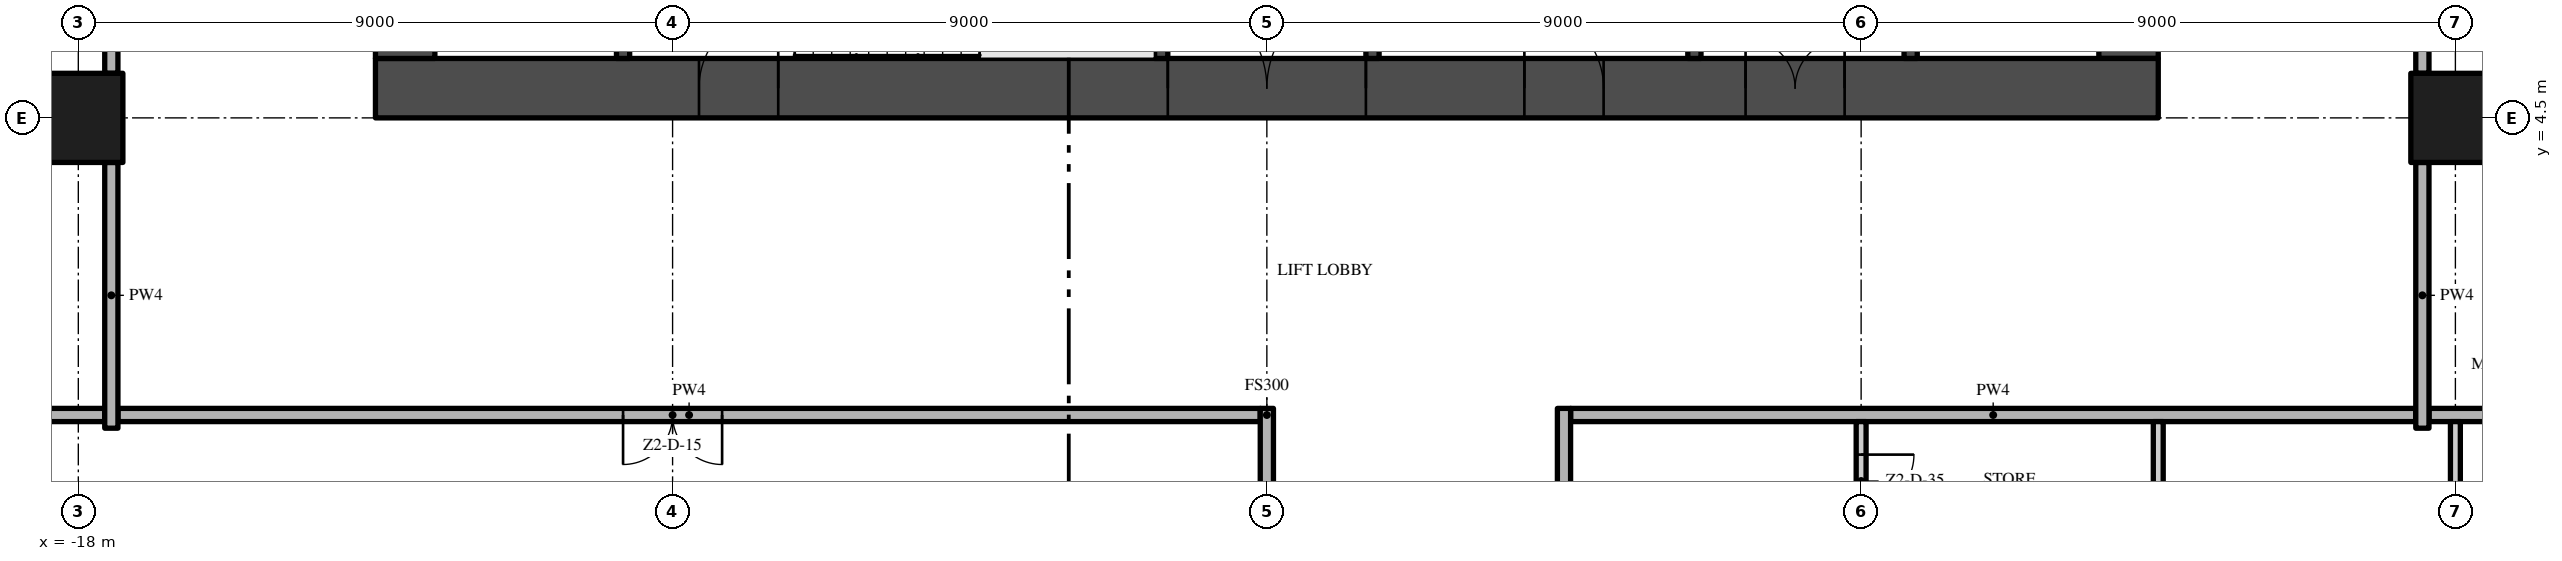
"""IFC4 building model, lengths in metres.
Left out: names, types, materials, properties, quantities, classifications, styles, units other than length and angle.
Written with IfcOpenShell. Run it as: python <this file> out.ifc"""

import sys

from ifc_helpers import new_model, si_unit, direction, frame, frame_2d, origin, origin_2d, place, context, subcontext, project, spatial, rectangle, extrude, element, fill, save


model = new_model("IFC4")
c1 = context("Model", 3, precision=1e-05, world=origin(), true_north=direction((0.0, 1.0)))
c2 = subcontext(c1, "Body", "Model", "MODEL_VIEW")
j1 = project(units=[si_unit("LENGTHUNIT", "METRE"), si_unit("PLANEANGLEUNIT", "RADIAN")], contexts=[c1])
p1 = place(None, origin())
s1 = spatial("IfcSite", under=j1, at=p1, CompositionType="ELEMENT")
p2 = place(p1, origin())
s2 = spatial("IfcBuilding", under=s1, at=p2, CompositionType="ELEMENT")
p3 = place(p2, frame((0.0, 0.0, 103.6)))
s3 = spatial("IfcBuildingStorey", under=s2, at=p3, CompositionType="ELEMENT", Elevation=103.6)
p4 = place(p3, frame((-13.5, 4.95, -0.3), z_axis=(0.0, 0.0, 1.0), x_axis=(1.0, 0.0, 0.0)))
e1 = element("IfcWall", 1, at=p4, inside=s3, PredefinedType="SHEAR", context=c2, shape_type="SweptSolid", body=[
    extrude(rectangle(XDim=27.0, YDim=0.9, at=frame_2d((13.5, 0.0))), origin(), (0.0, 0.0, 1.0), 3.8),
])
p5 = place(p4, frame((12.0, 0.0, 0.3)))
e2 = element("IfcOpeningElement", 2, at=p5, cuts=e1, PredefinedType="OPENING", context=c2, shape_type="SweptSolid", body=[
    extrude(rectangle(XDim=3.0, YDim=2.4, at=frame_2d((1.5, 1.2))), frame((0.0, 0.46, 0.0), z_axis=(0.0, -1.0, 0.0), x_axis=(1.0, 0.0, 0.0)), (0.0, 0.0, 1.0), 0.92),
])
p6 = place(p4, frame((4.9, 0.0, 0.3)))
e3 = element("IfcOpeningElement", 3, at=p6, cuts=e1, PredefinedType="OPENING", context=c2, shape_type="SweptSolid", body=[
    extrude(rectangle(XDim=1.2, YDim=2.2, at=frame_2d((0.6, 1.1))), frame((0.0, 0.46, 0.0), z_axis=(0.0, -1.0, 0.0), x_axis=(1.0, 0.0, 0.0)), (0.0, 0.0, 1.0), 0.92),
])
p7 = place(p4, frame((20.75, 0.0, 0.3)))
e4 = element("IfcOpeningElement", 4, at=p7, cuts=e1, PredefinedType="OPENING", context=c2, shape_type="SweptSolid", body=[
    extrude(rectangle(XDim=1.5, YDim=2.2, at=frame_2d((0.75, 1.1))), frame((0.0, 0.46, 0.0), z_axis=(0.0, -1.0, 0.0), x_axis=(1.0, 0.0, 0.0)), (0.0, 0.0, 1.0), 0.92),
])
p8 = place(p4, frame((17.4, 0.0, 0.3)))
e5 = element("IfcOpeningElement", 5, at=p8, cuts=e1, PredefinedType="OPENING", context=c2, shape_type="SweptSolid", body=[
    extrude(rectangle(XDim=1.2, YDim=2.2, at=frame_2d((0.6, 1.1))), frame((0.0, 0.46, 0.0), z_axis=(0.0, -1.0, 0.0), x_axis=(1.0, 0.0, 0.0)), (0.0, 0.0, 1.0), 0.92),
])
p9 = place(p3, frame((13.05, 5.4, -0.3), z_axis=(0.0, 0.0, 1.0), x_axis=(0.0, 1.0, 0.0)))
e6 = element("IfcWall", 6, at=p9, inside=s3, PredefinedType="SHEAR", context=c2, shape_type="SweptSolid", body=[
    extrude(rectangle(XDim=16.2, YDim=0.9, at=frame_2d((8.1, 0.0))), origin(), (0.0, 0.0, 1.0), 3.8),
])
p10 = place(p9, frame((6.0, 0.0, 0.3)))
e7 = element("IfcOpeningElement", 7, at=p10, cuts=e6, PredefinedType="OPENING", context=c2, shape_type="SweptSolid", body=[
    extrude(rectangle(XDim=1.2, YDim=2.2, at=frame_2d((0.6, 1.1))), frame((0.0, 0.46, 0.0), z_axis=(0.0, -1.0, 0.0), x_axis=(1.0, 0.0, 0.0)), (0.0, 0.0, 1.0), 0.92),
])
p11 = place(p3, frame((-13.05, 21.6, -0.3), z_axis=(0.0, 0.0, 1.0), x_axis=(0.0, -1.0, 0.0)))
e8 = element("IfcWall", 8, at=p11, inside=s3, PredefinedType="SHEAR", context=c2, shape_type="SweptSolid", body=[
    extrude(rectangle(XDim=16.2, YDim=0.9, at=frame_2d((8.1, 0.0))), origin(), (0.0, 0.0, 1.0), 3.8),
])
p12 = place(p11, frame((9.0, 0.0, 0.3)))
e9 = element("IfcOpeningElement", 9, at=p12, cuts=e8, PredefinedType="OPENING", context=c2, shape_type="SweptSolid", body=[
    extrude(rectangle(XDim=1.2, YDim=2.2, at=frame_2d((0.6, 1.1))), frame((0.0, 0.46, 0.0), z_axis=(0.0, -1.0, 0.0), x_axis=(1.0, 0.0, 0.0)), (0.0, 0.0, 1.0), 0.92),
])
for number, where, z_axis, x_axis in (
    (10, (-18.0, 4.5, 0.0), (0.0, 0.0, 1.0), (1.0, 0.0, 0.0)),
    (11, (18.0, 4.5, 0.0), (0.0, 0.0, 1.0), (1.0, 0.0, 0.0)),
):
    element("IfcColumn", number, at=place(p3, frame(where, z_axis=z_axis, x_axis=x_axis)), inside=s3, PredefinedType="COLUMN", context=c2, shape_type="SweptSolid", body=[
        extrude(rectangle(XDim=1.35, YDim=1.35, at=origin_2d()), origin(), (0.0, 0.0, 1.0), 3.5),
    ])
for number, where, z_axis, x_axis in (
    (12, (-9.75, 5.4, 0.0), (0.0, 0.0, 1.0), (0.0, 1.0, 0.0)),
    (13, (-1.6, 5.4, 0.0), (0.0, 0.0, 1.0), (0.0, 1.0, 0.0)),
):
    element("IfcWall", number, at=place(p3, frame(where, z_axis=z_axis, x_axis=x_axis)), inside=s3, PredefinedType="SHEAR", context=c2, shape_type="SweptSolid", body=[
        extrude(rectangle(XDim=2.55, YDim=0.2, at=frame_2d((1.275, 0.0))), origin(), (0.0, 0.0, 1.0), 3.5),
    ])
p13 = place(p3, frame((1.6, 11.5, 0.0), z_axis=(0.0, 0.0, 1.0), x_axis=(0.0, -1.0, 0.0)))
e14 = element("IfcWall", 14, at=p13, inside=s3, PredefinedType="SHEAR", context=c2, shape_type="SweptSolid", body=[
    extrude(rectangle(XDim=6.1, YDim=0.2, at=frame_2d((3.05, 0.0))), origin(), (0.0, 0.0, 1.0), 3.5),
])
p14 = place(p13, frame((2.2, 0.0, 0.0)))
e15 = element("IfcOpeningElement", 15, at=p14, cuts=e14, PredefinedType="OPENING", context=c2, shape_type="SweptSolid", body=[
    extrude(rectangle(XDim=0.9, YDim=2.1, at=frame_2d((0.45, 1.05))), frame((0.0, 0.11, 0.0), z_axis=(0.0, -1.0, 0.0), x_axis=(1.0, 0.0, 0.0)), (0.0, 0.0, 1.0), 0.22),
])
p15 = place(p3, frame((6.475, 5.4, 0.0), z_axis=(0.0, 0.0, 1.0), x_axis=(0.0, 1.0, 0.0)))
e16 = element("IfcWall", 16, at=p15, inside=s3, PredefinedType="SHEAR", context=c2, shape_type="SweptSolid", body=[
    extrude(rectangle(XDim=6.1, YDim=0.2, at=frame_2d((3.05, 0.0))), origin(), (0.0, 0.0, 1.0), 3.5),
])
p16 = place(p3, frame((9.75, 5.4, 0.0), z_axis=(0.0, 0.0, 1.0), x_axis=(0.0, 1.0, 0.0)))
e17 = element("IfcWall", 17, at=p16, inside=s3, PredefinedType="SHEAR", context=c2, shape_type="SweptSolid", body=[
    extrude(rectangle(XDim=2.2, YDim=0.2, at=frame_2d((1.1, 0.0))), origin(), (0.0, 0.0, 1.0), 3.5),
])
p17 = place(p16, frame((0.55, 0.0, 0.0)))
e18 = element("IfcOpeningElement", 18, at=p17, cuts=e17, PredefinedType="OPENING", context=c2, shape_type="SweptSolid", body=[
    extrude(rectangle(XDim=1.1, YDim=2.1, at=frame_2d((0.55, 1.05))), frame((0.0, 0.11, 0.0), z_axis=(0.0, -1.0, 0.0), x_axis=(1.0, 0.0, 0.0)), (0.0, 0.0, 1.0), 0.22),
])
p18 = place(p3, frame((-0.1, 0.0, 0.0), z_axis=(0.0, 0.0, 1.0), x_axis=(-1.0, 0.0, 0.0)))
e19 = element("IfcWall", 19, at=p18, inside=s3, PredefinedType="PARTITIONING", context=c2, shape_type="SweptSolid", body=[
    extrude(rectangle(XDim=17.3, YDim=0.2, at=frame_2d((8.65, 0.0))), origin(), (0.0, 0.0, 1.0), 3.5),
])
p19 = place(p18, frame((8.15, 0.0, 0.0)))
e20 = element("IfcOpeningElement", 20, at=p19, cuts=e19, PredefinedType="OPENING", context=c2, shape_type="SweptSolid", body=[
    extrude(rectangle(XDim=1.5, YDim=2.4, at=frame_2d((0.75, 1.2))), frame((0.0, 0.11, 0.0), z_axis=(0.0, -1.0, 0.0), x_axis=(1.0, 0.0, 0.0)), (0.0, 0.0, 1.0), 0.22),
])
p20 = place(p3, frame((4.6, 0.0, 0.0), z_axis=(0.0, 0.0, 1.0), x_axis=(1.0, 0.0, 0.0)))
e21 = element("IfcWall", 21, at=p20, inside=s3, PredefinedType="PARTITIONING", context=c2, shape_type="SweptSolid", body=[
    extrude(rectangle(XDim=12.8, YDim=0.2, at=frame_2d((6.4, 0.0))), origin(), (0.0, 0.0, 1.0), 3.5),
])
for number, where, z_axis, x_axis in (
    (22, (-26.7, 0.0, 0.0), (0.0, 0.0, 1.0), (1.0, 0.0, 0.0)),
    (23, (17.6, 0.0, 0.0), (0.0, 0.0, 1.0), (1.0, 0.0, 0.0)),
):
    element("IfcWall", number, at=place(p3, frame(where, z_axis=z_axis, x_axis=x_axis)), inside=s3, PredefinedType="PARTITIONING", context=c2, shape_type="SweptSolid", body=[
        extrude(rectangle(XDim=9.1, YDim=0.2, at=frame_2d((4.55, 0.0))), origin(), (0.0, 0.0, 1.0), 3.5),
    ])
p21 = place(p3, frame((-17.5, -0.2, 0.0), z_axis=(0.0, 0.0, 1.0), x_axis=(0.0, 1.0, 0.0)))
e24 = element("IfcWall", 24, at=p21, inside=s3, PredefinedType="PARTITIONING", context=c2, shape_type="SweptSolid", body=[
    extrude(rectangle(XDim=4.025, YDim=0.2, at=frame_2d((2.013, 0.0))), origin(), (0.0, 0.0, 1.0), 3.5),
])
p22 = place(p3, frame((-17.5, 5.175, 0.0), z_axis=(0.0, 0.0, 1.0), x_axis=(0.0, 1.0, 0.0)))
e25 = element("IfcWall", 25, at=p22, inside=s3, PredefinedType="PARTITIONING", context=c2, shape_type="SweptSolid", body=[
    extrude(rectangle(XDim=7.65, YDim=0.2, at=frame_2d((3.825, 0.0))), origin(), (0.0, 0.0, 1.0), 3.5),
])
p23 = place(p22, frame((3.225, 0.0, 0.0)))
e26 = element("IfcOpeningElement", 26, at=p23, cuts=e25, PredefinedType="OPENING", context=c2, shape_type="SweptSolid", body=[
    extrude(rectangle(XDim=1.2, YDim=2.4, at=frame_2d((0.6, 1.2))), frame((0.0, 0.11, 0.0), z_axis=(0.0, -1.0, 0.0), x_axis=(1.0, 0.0, 0.0)), (0.0, 0.0, 1.0), 0.22),
])
p24 = place(p3, frame((0.0, -3.825, 0.0), z_axis=(0.0, 0.0, 1.0), x_axis=(0.0, 1.0, 0.0)))
e27 = element("IfcWall", 27, at=p24, inside=s3, PredefinedType="PARTITIONING", context=c2, shape_type="SweptSolid", body=[
    extrude(rectangle(XDim=3.925, YDim=0.2, at=frame_2d((1.962, 0.0))), origin(), (0.0, 0.0, 1.0), 3.5),
])
p25 = place(p3, frame((4.5, 0.1, 0.0), z_axis=(0.0, 0.0, 1.0), x_axis=(0.0, -1.0, 0.0)))
e28 = element("IfcWall", 28, at=p25, inside=s3, PredefinedType="PARTITIONING", context=c2, shape_type="SweptSolid", body=[
    extrude(rectangle(XDim=22.3, YDim=0.2, at=frame_2d((11.15, 0.0))), origin(), (0.0, 0.0, 1.0), 3.5),
])
p26 = place(p25, frame((10.6, 0.0, 0.0)))
e29 = element("IfcOpeningElement", 29, at=p26, cuts=e28, PredefinedType="OPENING", context=c2, shape_type="SweptSolid", body=[
    extrude(rectangle(XDim=1.5, YDim=2.4, at=frame_2d((0.75, 1.2))), frame((0.0, 0.11, 0.0), z_axis=(0.0, -1.0, 0.0), x_axis=(1.0, 0.0, 0.0)), (0.0, 0.0, 1.0), 0.22),
])
p27 = place(p3, frame((9.0, -0.1, 0.0), z_axis=(0.0, 0.0, 1.0), x_axis=(0.0, -1.0, 0.0)))
e30 = element("IfcWall", 30, at=p27, inside=s3, PredefinedType="PARTITIONING", context=c2, shape_type="SweptSolid", body=[
    extrude(rectangle(XDim=3.725, YDim=0.15, at=frame_2d((1.863, 0.0))), origin(), (0.0, 0.0, 1.0), 3.5),
])
p28 = place(p27, frame((0.5, 0.0, 0.0)))
e31 = element("IfcOpeningElement", 31, at=p28, cuts=e30, PredefinedType="OPENING", context=c2, shape_type="SweptSolid", body=[
    extrude(rectangle(XDim=0.8, YDim=2.0, at=frame_2d((0.4, 1.0))), frame((0.0, 0.085, 0.0), z_axis=(0.0, -1.0, 0.0), x_axis=(1.0, 0.0, 0.0)), (0.0, 0.0, 1.0), 0.17),
])
p29 = place(p3, frame((13.5, -10.275, 0.0), z_axis=(0.0, 0.0, 1.0), x_axis=(0.0, 1.0, 0.0)))
e32 = element("IfcWall", 32, at=p29, inside=s3, PredefinedType="PARTITIONING", context=c2, shape_type="SweptSolid", body=[
    extrude(rectangle(XDim=10.175, YDim=0.15, at=frame_2d((5.088, 0.0))), origin(), (0.0, 0.0, 1.0), 3.5),
])
p30 = place(p3, frame((17.5, -0.2, 0.0), z_axis=(0.0, 0.0, 1.0), x_axis=(0.0, 1.0, 0.0)))
e33 = element("IfcWall", 33, at=p30, inside=s3, PredefinedType="PARTITIONING", context=c2, shape_type="SweptSolid", body=[
    extrude(rectangle(XDim=4.025, YDim=0.2, at=frame_2d((2.013, 0.0))), origin(), (0.0, 0.0, 1.0), 3.5),
])
p31 = place(p3, frame((17.5, 5.175, 0.0), z_axis=(0.0, 0.0, 1.0), x_axis=(0.0, 1.0, 0.0)))
e34 = element("IfcWall", 34, at=p31, inside=s3, PredefinedType="PARTITIONING", context=c2, shape_type="SweptSolid", body=[
    extrude(rectangle(XDim=7.65, YDim=0.2, at=frame_2d((3.825, 0.0))), origin(), (0.0, 0.0, 1.0), 3.5),
])
p32 = place(p3, frame((18.0, -0.1, 0.0), z_axis=(0.0, 0.0, 1.0), x_axis=(0.0, -1.0, 0.0)))
e35 = element("IfcWall", 35, at=p32, inside=s3, PredefinedType="PARTITIONING", context=c2, shape_type="SweptSolid", body=[
    extrude(rectangle(XDim=3.725, YDim=0.15, at=frame_2d((1.863, 0.0))), origin(), (0.0, 0.0, 1.0), 3.5),
])
p33 = place(p32, frame((2.575, 0.0, 0.0)))
e36 = element("IfcOpeningElement", 36, at=p33, cuts=e35, PredefinedType="OPENING", context=c2, shape_type="SweptSolid", body=[
    extrude(rectangle(XDim=1.0, YDim=2.4, at=frame_2d((0.5, 1.2))), frame((0.0, 0.085, 0.0), z_axis=(0.0, -1.0, 0.0), x_axis=(1.0, 0.0, 0.0)), (0.0, 0.0, 1.0), 0.17),
])
p34 = place(p5, frame((3.0, 0.0, 0.0), z_axis=(0.0, 0.0, 1.0), x_axis=(-1.0, 0.0, 0.0)))
e37 = element("IfcDoor", 37, at=p34, inside=s3, OperationType="DOUBLE_DOOR_SINGLE_SWING", PredefinedType="DOOR", context=c2, shape_type="SweptSolid", body=[
    extrude(rectangle(XDim=3.0, YDim=2.4, at=frame_2d((1.5, 1.2))), frame((0.0, 0.025, 0.0), z_axis=(0.0, -1.0, 0.0), x_axis=(1.0, 0.0, 0.0)), (0.0, 0.0, 1.0), 0.05),
])
fill(e2, e37)
p35 = place(p6, frame((1.2, 0.0, 0.0), z_axis=(0.0, 0.0, 1.0), x_axis=(-1.0, 0.0, 0.0)))
e38 = element("IfcDoor", 38, at=p35, inside=s3, OperationType="SINGLE_SWING_LEFT", PredefinedType="DOOR", context=c2, shape_type="SweptSolid", body=[
    extrude(rectangle(XDim=1.2, YDim=2.2, at=frame_2d((0.6, 1.1))), frame((0.0, 0.025, 0.0), z_axis=(0.0, -1.0, 0.0), x_axis=(1.0, 0.0, 0.0)), (0.0, 0.0, 1.0), 0.05),
])
fill(e3, e38)
p36 = place(p7, frame((1.5, 0.0, 0.0), z_axis=(0.0, 0.0, 1.0), x_axis=(-1.0, 0.0, 0.0)))
e39 = element("IfcDoor", 39, at=p36, inside=s3, OperationType="DOUBLE_DOOR_SINGLE_SWING", PredefinedType="DOOR", context=c2, shape_type="SweptSolid", body=[
    extrude(rectangle(XDim=1.5, YDim=2.2, at=frame_2d((0.75, 1.1))), frame((0.0, 0.025, 0.0), z_axis=(0.0, -1.0, 0.0), x_axis=(1.0, 0.0, 0.0)), (0.0, 0.0, 1.0), 0.05),
])
fill(e4, e39)
p37 = place(p8, frame((1.2, 0.0, 0.0), z_axis=(0.0, 0.0, 1.0), x_axis=(-1.0, 0.0, 0.0)))
e40 = element("IfcDoor", 40, at=p37, inside=s3, OperationType="SINGLE_SWING_RIGHT", PredefinedType="DOOR", context=c2, shape_type="SweptSolid", body=[
    extrude(rectangle(XDim=1.2, YDim=2.2, at=frame_2d((0.6, 1.1))), frame((0.0, 0.025, 0.0), z_axis=(0.0, -1.0, 0.0), x_axis=(1.0, 0.0, 0.0)), (0.0, 0.0, 1.0), 0.05),
])
fill(e5, e40)
p38 = place(p19, origin())
e41 = element("IfcDoor", 41, at=p38, inside=s3, OperationType="DOUBLE_DOOR_SINGLE_SWING", PredefinedType="DOOR", context=c2, shape_type="SweptSolid", body=[
    extrude(rectangle(XDim=1.5, YDim=2.4, at=frame_2d((0.75, 1.2))), frame((0.0, 0.025, 0.0), z_axis=(0.0, -1.0, 0.0), x_axis=(1.0, 0.0, 0.0)), (0.0, 0.0, 1.0), 0.05),
])
fill(e20, e41)
p39 = place(p28, origin())
e42 = element("IfcDoor", 42, at=p39, inside=s3, OperationType="SINGLE_SWING_LEFT", PredefinedType="DOOR", context=c2, shape_type="SweptSolid", body=[
    extrude(rectangle(XDim=0.8, YDim=2.0, at=frame_2d((0.4, 1.0))), frame((0.0, 0.025, 0.0), z_axis=(0.0, -1.0, 0.0), x_axis=(1.0, 0.0, 0.0)), (0.0, 0.0, 1.0), 0.05),
])
fill(e31, e42)
save(model, sys.argv[1])
